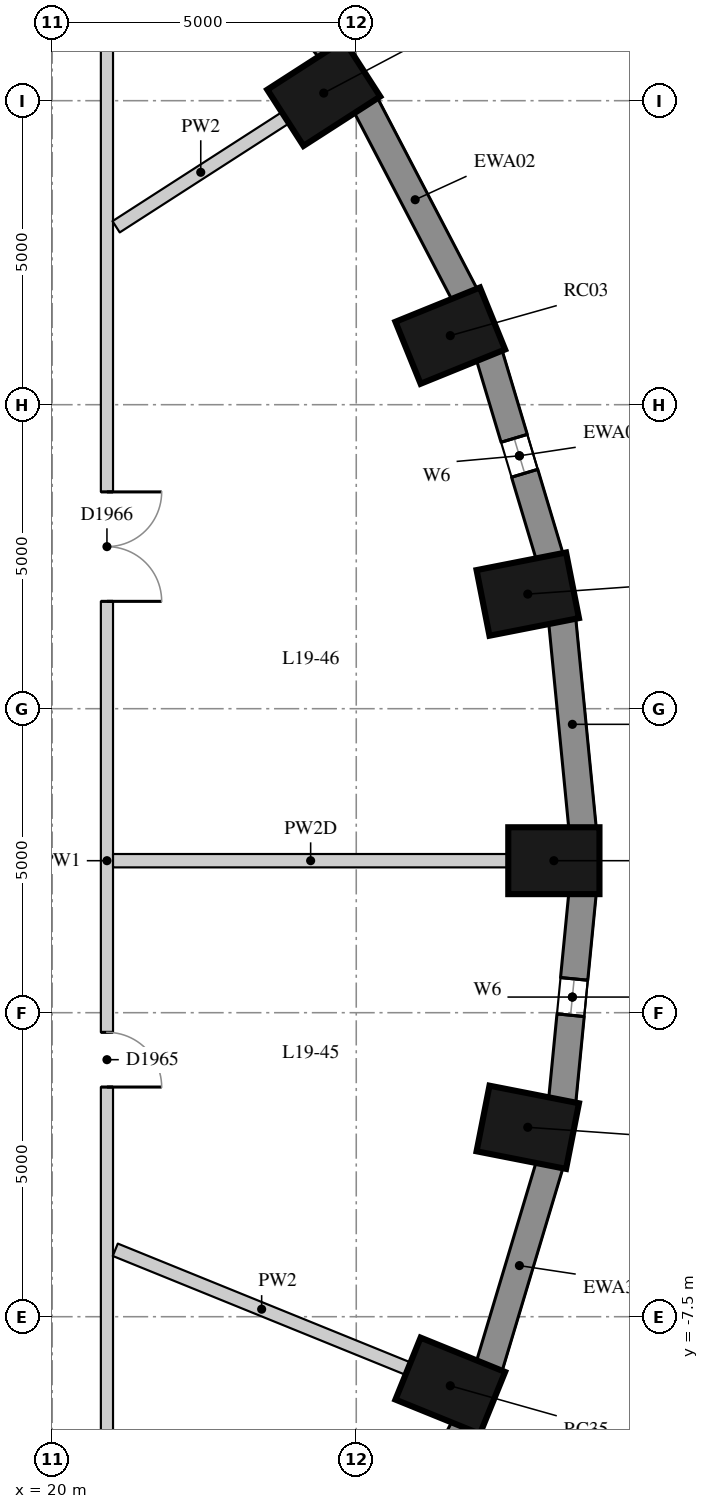
"""IFC4 building model, lengths in metres.
Left out: names, types, materials, properties, quantities, classifications, styles, units other than length and angle.
Written with IfcOpenShell. Run it as: python <this file> out.ifc"""

import sys

from ifc_helpers import new_model, si_unit, direction, frame, frame_2d, origin, origin_2d, place, context, subcontext, project, spatial, rectangle, extrude, element, fill, save


model = new_model("IFC4")
c1 = context("Model", 3, precision=1e-05, world=origin(), true_north=direction((0.0, 1.0)))
c2 = subcontext(c1, "Body", "Model", "MODEL_VIEW")
j1 = project(units=[si_unit("LENGTHUNIT", "METRE"), si_unit("PLANEANGLEUNIT", "RADIAN")], contexts=[c1])
p1 = place(None, origin())
s1 = spatial("IfcSite", under=j1, at=p1, CompositionType="ELEMENT")
p2 = place(p1, origin())
s2 = spatial("IfcBuilding", under=s1, at=p2, CompositionType="ELEMENT")
p3 = place(p2, frame((0.0, 0.0, 71.2)))
s3 = spatial("IfcBuildingStorey", under=s2, at=p3, CompositionType="ELEMENT", Elevation=71.2)
for number, where, z_axis, x_axis in (
    (1, (28.25, 0.0, 0.0), (0.0, 0.0, 1.0), (1.0, 0.0, 0.0)),
    (2, (27.821, 4.385, 0.0), (0.0, 0.0, 1.0), (0.981, 0.193, 0.0)),
    (3, (26.546, 8.636, 0.0), (0.0, 0.0, 1.0), (0.927, 0.376, 0.0)),
    (4, (24.465, 12.625, 0.0), (0.0, 0.0, 1.0), (0.841, 0.541, 0.0)),
    (5, (26.546, -8.636, 0.0), (0.0, 0.0, 1.0), (0.927, -0.376, 0.0)),
    (6, (27.821, -4.385, 0.0), (0.0, 0.0, 1.0), (0.981, -0.193, 0.0)),
):
    element("IfcColumn", number, at=place(p3, frame(where, z_axis=z_axis, x_axis=x_axis)), inside=s3, PredefinedType="COLUMN", context=c2, shape_type="SweptSolid", body=[
        extrude(rectangle(XDim=1.5, YDim=1.1, at=origin_2d()), origin(), (0.0, 0.0, 1.0), 3.3),
    ])
p4 = place(p3, frame((28.722, 0.53, 0.0), z_axis=(0.0, 0.0, 1.0), x_axis=(-0.097389581596, 0.995246336038, 0.0)))
e7 = element("IfcWall", 7, at=p4, inside=s3, PredefinedType="SOLIDWALL", context=c2, shape_type="SweptSolid", body=[
    extrude(rectangle(XDim=3.442, YDim=0.45, at=frame_2d((1.721, 0.0))), origin(), (0.0, 0.0, 1.0), 3.02),
])
p5 = place(p3, frame((28.182, 4.996, 0.0), z_axis=(0.0, 0.0, 1.0), x_axis=(-0.287064133733, 0.957911364963, 0.0)))
e8 = element("IfcWall", 8, at=p5, inside=s3, PredefinedType="SOLIDWALL", context=c2, shape_type="SweptSolid", body=[
    extrude(rectangle(XDim=3.473, YDim=0.45, at=frame_2d((1.737, 0.0))), origin(), (0.0, 0.0, 1.0), 3.02),
])
p6 = place(p5, frame((1.437, 0.0, 0.4)))
e9 = element("IfcOpeningElement", 9, at=p6, cuts=e8, PredefinedType="OPENING", context=c2, shape_type="SweptSolid", body=[
    extrude(rectangle(XDim=0.6, YDim=1.75, at=frame_2d((0.3, 0.875))), frame((0.0, 0.235, 0.0), z_axis=(0.0, -1.0, 0.0), x_axis=(1.0, 0.0, 0.0)), (0.0, 0.0, 1.0), 0.47),
])
p7 = place(p3, frame((26.786, 9.305, 0.0), z_axis=(0.0, 0.0, 1.0), x_axis=(-0.462492775226, 0.886623050041, 0.0)))
e10 = element("IfcWall", 10, at=p7, inside=s3, PredefinedType="SOLIDWALL", context=c2, shape_type="SweptSolid", body=[
    extrude(rectangle(XDim=3.532, YDim=0.45, at=frame_2d((1.766, 0.0))), origin(), (0.0, 0.0, 1.0), 3.02),
])
p8 = place(p3, frame((24.578, 13.328, 0.0), z_axis=(0.0, 0.0, 1.0), x_axis=(-0.616661975264, 0.787228053529, 0.0)))
e11 = element("IfcWall", 11, at=p8, inside=s3, PredefinedType="SOLIDWALL", context=c2, shape_type="SweptSolid", body=[
    extrude(rectangle(XDim=3.61, YDim=0.45, at=frame_2d((1.805, 0.0))), origin(), (0.0, 0.0, 1.0), 3.02),
])
p9 = place(p8, frame((1.505, 0.0, 0.4)))
e12 = element("IfcOpeningElement", 12, at=p9, cuts=e11, PredefinedType="OPENING", context=c2, shape_type="SweptSolid", body=[
    extrude(rectangle(XDim=0.6, YDim=1.75, at=frame_2d((0.3, 0.875))), frame((0.0, 0.235, 0.0), z_axis=(0.0, -1.0, 0.0), x_axis=(1.0, 0.0, 0.0)), (0.0, 0.0, 1.0), 0.47),
])
p10 = place(p3, frame((25.152, -12.437, 0.0), z_axis=(0.0, 0.0, 1.0), x_axis=(0.462492775226, 0.886623050041, 0.0)))
e13 = element("IfcWall", 13, at=p10, inside=s3, PredefinedType="SOLIDWALL", context=c2, shape_type="SweptSolid", body=[
    extrude(rectangle(XDim=3.532, YDim=0.45, at=frame_2d((1.766, 0.0))), origin(), (0.0, 0.0, 1.0), 3.02),
])
p11 = place(p10, frame((1.466, 0.0, 0.4)))
e14 = element("IfcOpeningElement", 14, at=p11, cuts=e13, PredefinedType="OPENING", context=c2, shape_type="SweptSolid", body=[
    extrude(rectangle(XDim=0.6, YDim=1.75, at=frame_2d((0.3, 0.875))), frame((0.0, 0.235, 0.0), z_axis=(0.0, -1.0, 0.0), x_axis=(1.0, 0.0, 0.0)), (0.0, 0.0, 1.0), 0.47),
])
p12 = place(p3, frame((27.185, -8.323, 0.0), z_axis=(0.0, 0.0, 1.0), x_axis=(0.287064133733, 0.957911364963, 0.0)))
e15 = element("IfcWall", 15, at=p12, inside=s3, PredefinedType="SOLIDWALL", context=c2, shape_type="SweptSolid", body=[
    extrude(rectangle(XDim=3.473, YDim=0.45, at=frame_2d((1.737, 0.0))), origin(), (0.0, 0.0, 1.0), 3.02),
])
p13 = place(p3, frame((28.387, -3.956, 0.0), z_axis=(0.0, 0.0, 1.0), x_axis=(0.097389581596, 0.995246336038, 0.0)))
e16 = element("IfcWall", 16, at=p13, inside=s3, PredefinedType="SOLIDWALL", context=c2, shape_type="SweptSolid", body=[
    extrude(rectangle(XDim=3.442, YDim=0.45, at=frame_2d((1.721, 0.0))), origin(), (0.0, 0.0, 1.0), 3.02),
])
p14 = place(p13, frame((1.421, 0.0, 0.4)))
e17 = element("IfcOpeningElement", 17, at=p14, cuts=e16, PredefinedType="OPENING", context=c2, shape_type="SweptSolid", body=[
    extrude(rectangle(XDim=0.6, YDim=1.75, at=frame_2d((0.3, 0.875))), frame((0.0, 0.235, 0.0), z_axis=(0.0, -1.0, 0.0), x_axis=(1.0, 0.0, 0.0)), (0.0, 0.0, 1.0), 0.47),
])
p15 = place(p3, frame((20.9, 13.7, 0.0), z_axis=(0.0, 0.0, 1.0), x_axis=(0.0, -1.0, 0.0)))
e18 = element("IfcWall", 18, at=p15, inside=s3, PredefinedType="PARTITIONING", context=c2, shape_type="SweptSolid", body=[
    extrude(rectangle(XDim=27.4, YDim=0.2, at=frame_2d((13.7, 0.0))), origin(), (0.0, 0.0, 1.0), 3.02),
])
p16 = place(p15, frame((16.523, 0.0, 0.0)))
e19 = element("IfcOpeningElement", 19, at=p16, cuts=e18, PredefinedType="OPENING", context=c2, shape_type="SweptSolid", body=[
    extrude(rectangle(XDim=0.9, YDim=2.1, at=frame_2d((0.45, 1.05))), frame((0.0, 0.11, 0.0), z_axis=(0.0, -1.0, 0.0), x_axis=(1.0, 0.0, 0.0)), (0.0, 0.0, 1.0), 0.22),
])
p17 = place(p15, frame((7.635, 0.0, 0.0)))
e20 = element("IfcOpeningElement", 20, at=p17, cuts=e18, PredefinedType="OPENING", context=c2, shape_type="SweptSolid", body=[
    extrude(rectangle(XDim=1.8, YDim=2.1, at=frame_2d((0.9, 1.05))), frame((0.0, 0.11, 0.0), z_axis=(0.0, -1.0, 0.0), x_axis=(1.0, 0.0, 0.0)), (0.0, 0.0, 1.0), 0.22),
])
p18 = place(p3, frame((27.5, 0.0, 0.0), z_axis=(0.0, 0.0, 1.0), x_axis=(-1.0, 0.0, 0.0)))
e21 = element("IfcWall", 21, at=p18, inside=s3, PredefinedType="PARTITIONING", context=c2, shape_type="SweptSolid", body=[
    extrude(rectangle(XDim=6.5, YDim=0.22, at=frame_2d((3.25, 0.0))), origin(), (0.0, 0.0, 1.0), 2.47),
])
p19 = place(p3, frame((23.835, 12.219, 0.0), z_axis=(0.0, 0.0, 1.0), x_axis=(-0.840713483419, -0.541480229368, 0.0)))
e22 = element("IfcWall", 22, at=p19, inside=s3, PredefinedType="PARTITIONING", context=c2, shape_type="SweptSolid", body=[
    extrude(rectangle(XDim=3.312, YDim=0.22, at=frame_2d((1.656, 0.0))), origin(), (0.0, 0.0, 1.0), 3.02),
])
p20 = place(p3, frame((25.851, -8.354, 0.0), z_axis=(0.0, 0.0, 1.0), x_axis=(-0.926545919269, 0.376181684145, 0.0)))
e23 = element("IfcWall", 23, at=p20, inside=s3, PredefinedType="PARTITIONING", context=c2, shape_type="SweptSolid", body=[
    extrude(rectangle(XDim=5.196, YDim=0.22, at=frame_2d((2.598, 0.0))), origin(), (0.0, 0.0, 1.0), 3.02),
])
p21 = place(p6, origin())
e24 = element("IfcWindow", 24, at=p21, inside=s3, PartitioningType="SINGLE_PANEL", PredefinedType="WINDOW", context=c2, shape_type="SweptSolid", body=[
    extrude(rectangle(XDim=0.6, YDim=1.75, at=frame_2d((0.3, 0.875))), frame((0.0, 0.035, 0.0), z_axis=(0.0, -1.0, 0.0), x_axis=(1.0, 0.0, 0.0)), (0.0, 0.0, 1.0), 0.06),
])
fill(e9, e24)
p22 = place(p14, origin())
e25 = element("IfcWindow", 25, at=p22, inside=s3, PartitioningType="SINGLE_PANEL", PredefinedType="WINDOW", context=c2, shape_type="SweptSolid", body=[
    extrude(rectangle(XDim=0.6, YDim=1.75, at=frame_2d((0.3, 0.875))), frame((0.0, 0.035, 0.0), z_axis=(0.0, -1.0, 0.0), x_axis=(1.0, 0.0, 0.0)), (0.0, 0.0, 1.0), 0.06),
])
fill(e17, e25)
p23 = place(p16, origin())
e26 = element("IfcDoor", 26, at=p23, inside=s3, OperationType="SINGLE_SWING_RIGHT", PredefinedType="DOOR", context=c2, shape_type="SweptSolid", body=[
    extrude(rectangle(XDim=0.9, YDim=2.1, at=frame_2d((0.45, 1.05))), frame((0.0, 0.025, 0.0), z_axis=(0.0, -1.0, 0.0), x_axis=(1.0, 0.0, 0.0)), (0.0, 0.0, 1.0), 0.05),
])
fill(e19, e26)
p24 = place(p17, origin())
e27 = element("IfcDoor", 27, at=p24, inside=s3, OperationType="DOUBLE_DOOR_SINGLE_SWING", PredefinedType="DOOR", context=c2, shape_type="SweptSolid", body=[
    extrude(rectangle(XDim=1.8, YDim=2.1, at=frame_2d((0.9, 1.05))), frame((0.0, 0.025, 0.0), z_axis=(0.0, -1.0, 0.0), x_axis=(1.0, 0.0, 0.0)), (0.0, 0.0, 1.0), 0.05),
])
fill(e20, e27)
save(model, sys.argv[1])
